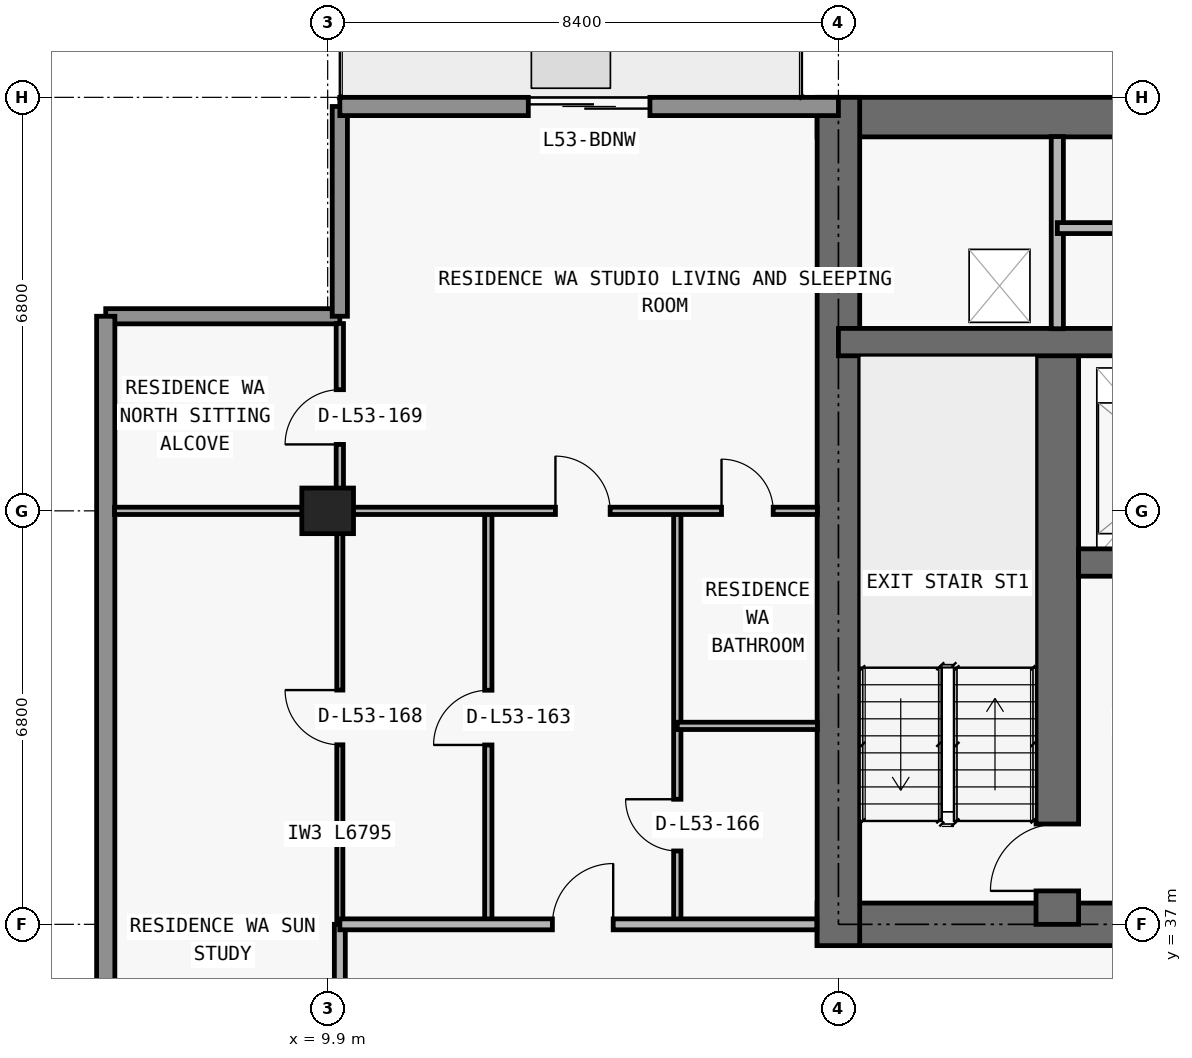
"""IFC4 building model, lengths in metres.
Left out: names, types, materials, properties, quantities, classifications, styles, units other than length and angle.
Written with IfcOpenShell. Run it as: python <this file> out.ifc"""

import sys

from ifc_helpers import new_model, si_unit, direction, frame, frame_2d, origin, origin_2d, place, context, subcontext, project, spatial, rectangle, extrude, element, fill, save


model = new_model("IFC4")
c1 = context("Model", 3, precision=1e-05, world=origin(), true_north=direction((0.0, 1.0)))
c2 = subcontext(c1, "Body", "Model", "MODEL_VIEW")
j1 = project(units=[si_unit("LENGTHUNIT", "METRE"), si_unit("PLANEANGLEUNIT", "RADIAN")], contexts=[c1])
p1 = place(None, origin())
s1 = spatial("IfcSite", under=j1, at=p1, CompositionType="ELEMENT")
p2 = place(p1, origin())
s2 = spatial("IfcBuilding", under=s1, at=p2, CompositionType="ELEMENT")
p3 = place(p2, frame((0.0, 0.0, 191.7)))
s3 = spatial("IfcBuildingStorey", under=s2, at=p3, CompositionType="ELEMENT", Elevation=191.7)
p4 = place(p3, frame((9.9, 43.8, 0.0), z_axis=(0.0, 0.0, 1.0), x_axis=(1.0, 0.0, 0.0)))
e1 = element("IfcColumn", 1, at=p4, inside=s3, PredefinedType="COLUMN", context=c2, shape_type="SweptSolid", body=[
    extrude(rectangle(XDim=0.85, YDim=0.75, at=origin_2d()), origin(), (0.0, 0.0, 1.0), 3.05),
])
p5 = place(p3, frame((17.95, 37.0, 0.0), z_axis=(0.0, 0.0, 1.0), x_axis=(1.0, 0.0, 0.0)))
e2 = element("IfcWall", 2, at=p5, inside=s3, PredefinedType="SHEAR", context=c2, shape_type="SweptSolid", body=[
    extrude(rectangle(XDim=41.9, YDim=0.7, at=frame_2d((20.95, 0.0))), origin(), (0.0, 0.0, 1.0), 3.05),
])
p6 = place(p5, frame((14.35, 0.0, 0.0)))
e3 = element("IfcOpeningElement", 3, at=p6, cuts=e2, PredefinedType="OPENING", context=c2, shape_type="SweptSolid", body=[
    extrude(rectangle(XDim=1.1, YDim=2.15, at=frame_2d((0.55, 1.075))), frame((0.0, 0.36, 0.0), z_axis=(0.0, -1.0, 0.0), x_axis=(1.0, 0.0, 0.0)), (0.0, 0.0, 1.0), 0.72),
])
p7 = place(p5, frame((6.2, 0.0, 0.0)))
e4 = element("IfcOpeningElement", 4, at=p7, cuts=e2, PredefinedType="OPENING", context=c2, shape_type="SweptSolid", body=[
    extrude(rectangle(XDim=1.05, YDim=2.15, at=frame_2d((0.525, 1.075))), frame((0.0, 0.36, 0.0), z_axis=(0.0, -1.0, 0.0), x_axis=(1.0, 0.0, 0.0)), (0.0, 0.0, 1.0), 0.72),
])
p8 = place(p5, frame((34.7, 0.0, 0.0)))
e5 = element("IfcOpeningElement", 5, at=p8, cuts=e2, PredefinedType="OPENING", context=c2, shape_type="SweptSolid", body=[
    extrude(rectangle(XDim=1.05, YDim=2.15, at=frame_2d((0.525, 1.075))), frame((0.0, 0.36, 0.0), z_axis=(0.0, -1.0, 0.0), x_axis=(1.0, 0.0, 0.0)), (0.0, 0.0, 1.0), 0.72),
])
p9 = place(p5, frame((10.812, 0.0, 0.0)))
e6 = element("IfcOpeningElement", 6, at=p9, cuts=e2, PredefinedType="OPENING", context=c2, shape_type="SweptSolid", body=[
    extrude(rectangle(XDim=1.05, YDim=2.15, at=frame_2d((0.525, 1.075))), frame((0.0, 0.36, 0.0), z_axis=(0.0, -1.0, 0.0), x_axis=(1.0, 0.0, 0.0)), (0.0, 0.0, 1.0), 0.72),
])
p10 = place(p5, frame((24.05, 0.0, 0.0)))
e7 = element("IfcOpeningElement", 7, at=p10, cuts=e2, PredefinedType="OPENING", context=c2, shape_type="SweptSolid", body=[
    extrude(rectangle(XDim=1.05, YDim=2.15, at=frame_2d((0.525, 1.075))), frame((0.0, 0.36, 0.0), z_axis=(0.0, -1.0, 0.0), x_axis=(1.0, 0.0, 0.0)), (0.0, 0.0, 1.0), 0.72),
])
p11 = place(p3, frame((17.95, 50.275, 0.0), z_axis=(0.0, 0.0, 1.0), x_axis=(1.0, 0.0, 0.0)))
e8 = element("IfcWall", 8, at=p11, inside=s3, PredefinedType="SHEAR", context=c2, shape_type="SweptSolid", body=[
    extrude(rectangle(XDim=41.9, YDim=0.65, at=frame_2d((20.95, 0.0))), origin(), (0.0, 0.0, 1.0), 3.05),
])
p12 = place(p3, frame((18.3, 36.65, 0.0), z_axis=(0.0, 0.0, 1.0), x_axis=(0.0, 1.0, 0.0)))
e9 = element("IfcWall", 9, at=p12, inside=s3, PredefinedType="SHEAR", context=c2, shape_type="SweptSolid", body=[
    extrude(rectangle(XDim=13.95, YDim=0.7, at=frame_2d((6.975, 0.0))), origin(), (0.0, 0.0, 1.0), 3.05),
])
p13 = place(p3, frame((21.9, 37.0, 0.0), z_axis=(0.0, 0.0, 1.0), x_axis=(0.0, 1.0, 0.0)))
e10 = element("IfcWall", 10, at=p13, inside=s3, PredefinedType="SHEAR", context=c2, shape_type="SweptSolid", body=[
    extrude(rectangle(XDim=9.575, YDim=0.7, at=frame_2d((4.788, 0.0))), origin(), (0.0, 0.0, 1.0), 3.05),
])
p14 = place(p13, frame((0.55, 0.0, 0.0)))
e11 = element("IfcOpeningElement", 11, at=p14, cuts=e10, PredefinedType="OPENING", context=c2, shape_type="SweptSolid", body=[
    extrude(rectangle(XDim=1.1, YDim=2.15, at=frame_2d((0.55, 1.075))), frame((0.0, 0.36, 0.0), z_axis=(0.0, -1.0, 0.0), x_axis=(1.0, 0.0, 0.0)), (0.0, 0.0, 1.0), 0.72),
])
p15 = place(p3, frame((22.25, 42.95, 0.0), z_axis=(0.0, 0.0, 1.0), x_axis=(1.0, 0.0, 0.0)))
e12 = element("IfcWall", 12, at=p15, inside=s3, PredefinedType="SHEAR", context=c2, shape_type="SweptSolid", body=[
    extrude(rectangle(XDim=33.3, YDim=0.45, at=frame_2d((16.65, 0.0))), origin(), (0.0, 0.0, 1.0), 3.05),
])
p16 = place(p15, frame((1.05, 0.0, 0.0)))
e13 = element("IfcOpeningElement", 13, at=p16, cuts=e12, PredefinedType="OPENING", context=c2, shape_type="SweptSolid", body=[
    extrude(rectangle(XDim=1.2, YDim=2.2, at=frame_2d((0.6, 1.1))), frame((0.0, 0.235, 0.0), z_axis=(0.0, -1.0, 0.0), x_axis=(1.0, 0.0, 0.0)), (0.0, 0.0, 1.0), 0.47),
])
p17 = place(p15, frame((31.05, 0.0, 0.0)))
e14 = element("IfcOpeningElement", 14, at=p17, cuts=e12, PredefinedType="OPENING", context=c2, shape_type="SweptSolid", body=[
    extrude(rectangle(XDim=1.2, YDim=2.2, at=frame_2d((0.6, 1.1))), frame((0.0, 0.235, 0.0), z_axis=(0.0, -1.0, 0.0), x_axis=(1.0, 0.0, 0.0)), (0.0, 0.0, 1.0), 0.47),
])
p18 = place(p15, frame((26.45, 0.0, 0.0)))
e15 = element("IfcOpeningElement", 15, at=p18, cuts=e12, PredefinedType="OPENING", context=c2, shape_type="SweptSolid", body=[
    extrude(rectangle(XDim=1.1, YDim=2.2, at=frame_2d((0.55, 1.1))), frame((0.0, 0.235, 0.0), z_axis=(0.0, -1.0, 0.0), x_axis=(1.0, 0.0, 0.0)), (0.0, 0.0, 1.0), 0.47),
])
p19 = place(p15, frame((5.95, 0.0, 0.0)))
e16 = element("IfcOpeningElement", 16, at=p19, cuts=e12, PredefinedType="OPENING", context=c2, shape_type="SweptSolid", body=[
    extrude(rectangle(XDim=1.1, YDim=2.2, at=frame_2d((0.55, 1.1))), frame((0.0, 0.235, 0.0), z_axis=(0.0, -1.0, 0.0), x_axis=(1.0, 0.0, 0.0)), (0.0, 0.0, 1.0), 0.47),
])
p20 = place(p15, frame((3.625, 0.0, 0.0)))
e17 = element("IfcOpeningElement", 17, at=p20, cuts=e12, PredefinedType="OPENING", context=c2, shape_type="SweptSolid", body=[
    extrude(rectangle(XDim=1.05, YDim=2.15, at=frame_2d((0.525, 1.075))), frame((0.0, 0.235, 0.0), z_axis=(0.0, -1.0, 0.0), x_axis=(1.0, 0.0, 0.0)), (0.0, 0.0, 1.0), 0.47),
])
p21 = place(p15, frame((28.675, 0.0, 0.0)))
e18 = element("IfcOpeningElement", 18, at=p21, cuts=e12, PredefinedType="OPENING", context=c2, shape_type="SweptSolid", body=[
    extrude(rectangle(XDim=1.05, YDim=2.15, at=frame_2d((0.525, 1.075))), frame((0.0, 0.235, 0.0), z_axis=(0.0, -1.0, 0.0), x_axis=(1.0, 0.0, 0.0)), (0.0, 0.0, 1.0), 0.47),
])
p22 = place(p15, frame((15.225, 0.0, 0.0)))
e19 = element("IfcOpeningElement", 19, at=p22, cuts=e12, PredefinedType="OPENING", context=c2, shape_type="SweptSolid", body=[
    extrude(rectangle(XDim=1.0, YDim=2.2, at=frame_2d((0.5, 1.1))), frame((0.0, 0.235, 0.0), z_axis=(0.0, -1.0, 0.0), x_axis=(1.0, 0.0, 0.0)), (0.0, 0.0, 1.0), 0.47),
])
p23 = place(p15, frame((21.975, 0.0, 0.0)))
e20 = element("IfcOpeningElement", 20, at=p23, cuts=e12, PredefinedType="OPENING", context=c2, shape_type="SweptSolid", body=[
    extrude(rectangle(XDim=1.0, YDim=2.2, at=frame_2d((0.5, 1.1))), frame((0.0, 0.235, 0.0), z_axis=(0.0, -1.0, 0.0), x_axis=(1.0, 0.0, 0.0)), (0.0, 0.0, 1.0), 0.47),
])
p24 = place(p3, frame((18.3, 46.575, 0.0), z_axis=(0.0, 0.0, 1.0), x_axis=(1.0, 0.0, 0.0)))
e21 = element("IfcWall", 21, at=p24, inside=s3, PredefinedType="SHEAR", context=c2, shape_type="SweptSolid", body=[
    extrude(rectangle(XDim=41.2, YDim=0.45, at=frame_2d((20.6, 0.0))), origin(), (0.0, 0.0, 1.0), 3.05),
])
p25 = place(p24, frame((7.575, 0.0, 0.0)))
e22 = element("IfcOpeningElement", 22, at=p25, cuts=e21, PredefinedType="OPENING", context=c2, shape_type="SweptSolid", body=[
    extrude(rectangle(XDim=1.05, YDim=2.15, at=frame_2d((0.525, 1.075))), frame((0.0, 0.235, 0.0), z_axis=(0.0, -1.0, 0.0), x_axis=(1.0, 0.0, 0.0)), (0.0, 0.0, 1.0), 0.47),
])
p26 = place(p24, frame((32.625, 0.0, 0.0)))
e23 = element("IfcOpeningElement", 23, at=p26, cuts=e21, PredefinedType="OPENING", context=c2, shape_type="SweptSolid", body=[
    extrude(rectangle(XDim=1.05, YDim=2.15, at=frame_2d((0.525, 1.075))), frame((0.0, 0.235, 0.0), z_axis=(0.0, -1.0, 0.0), x_axis=(1.0, 0.0, 0.0)), (0.0, 0.0, 1.0), 0.47),
])
p27 = place(p3, frame((6.25, 47.0, 0.0), z_axis=(0.0, 0.0, 1.0), x_axis=(1.0, 0.0, 0.0)))
e24 = element("IfcWall", 24, at=p27, inside=s3, PredefinedType="ELEMENTEDWALL", context=c2, shape_type="SweptSolid", body=[
    extrude(rectangle(XDim=3.85, YDim=0.25, at=frame_2d((1.925, 0.0))), origin(), (0.0, 0.0, 1.0), 3.05),
])
p28 = place(p3, frame((10.1, 47.0, 0.0), z_axis=(0.0, 0.0, 1.0), x_axis=(0.0, 1.0, 0.0)))
e25 = element("IfcWall", 25, at=p28, inside=s3, PredefinedType="ELEMENTEDWALL", context=c2, shape_type="SweptSolid", body=[
    extrude(rectangle(XDim=3.45, YDim=0.25, at=frame_2d((1.725, 0.0))), origin(), (0.0, 0.0, 1.0), 3.05),
])
p29 = place(p3, frame((6.25, 29.1, 0.0), z_axis=(0.0, 0.0, 1.0), x_axis=(0.0, 1.0, 0.0)))
e26 = element("IfcWall", 26, at=p29, inside=s3, PredefinedType="STANDARD", context=c2, shape_type="SweptSolid", body=[
    extrude(rectangle(XDim=17.9, YDim=0.3, at=frame_2d((8.95, 0.0))), origin(), (0.0, 0.0, 1.0), 3.05),
])
p30 = place(p3, frame((10.1, 50.45, 0.0), z_axis=(0.0, 0.0, 1.0), x_axis=(1.0, 0.0, 0.0)))
e27 = element("IfcWall", 27, at=p30, inside=s3, PredefinedType="STANDARD", context=c2, shape_type="SweptSolid", body=[
    extrude(rectangle(XDim=8.2, YDim=0.3, at=frame_2d((4.1, 0.0))), origin(), (0.0, 0.0, 1.0), 3.05),
])
p31 = place(p30, frame((3.1, 0.0, 0.0)))
e28 = element("IfcOpeningElement", 28, at=p31, cuts=e27, PredefinedType="OPENING", context=c2, shape_type="SweptSolid", body=[
    extrude(rectangle(XDim=2.0, YDim=2.3, at=frame_2d((1.0, 1.15))), frame((0.0, 0.16, 0.0), z_axis=(0.0, -1.0, 0.0), x_axis=(1.0, 0.0, 0.0)), (0.0, 0.0, 1.0), 0.32),
])
p32 = place(p3, frame((10.1, 33.505, 0.0), z_axis=(0.0, 0.0, 1.0), x_axis=(0.0, 1.0, 0.0)))
e29 = element("IfcWall", 29, at=p32, inside=s3, PredefinedType="PARTITIONING", context=c2, shape_type="SweptSolid", body=[
    extrude(rectangle(XDim=3.495, YDim=0.18, at=frame_2d((1.748, 0.0))), origin(), (0.0, 0.0, 1.0), 2.263),
])
p33 = place(p3, frame((10.1, 37.005, 0.0), z_axis=(0.0, 0.0, 1.0), x_axis=(0.0, 1.0, 0.0)))
e30 = element("IfcWall", 30, at=p33, inside=s3, PredefinedType="MOVABLE", context=c2, shape_type="SweptSolid", body=[
    extrude(rectangle(XDim=6.795, YDim=0.1, at=frame_2d((3.397, 0.0))), origin(), (0.0, 0.0, 1.0), 2.263),
])
p34 = place(p33, frame((2.948, 0.0, 0.0)))
e31 = element("IfcOpeningElement", 31, at=p34, cuts=e30, PredefinedType="OPENING", context=c2, shape_type="SweptSolid", body=[
    extrude(rectangle(XDim=0.9, YDim=2.15, at=frame_2d((0.45, 1.075))), frame((0.0, 0.06, 0.0), z_axis=(0.0, -1.0, 0.0), x_axis=(1.0, 0.0, 0.0)), (0.0, 0.0, 1.0), 0.12),
])
p35 = place(p3, frame((10.1, 43.805, 0.0), z_axis=(0.0, 0.0, 1.0), x_axis=(0.0, 1.0, 0.0)))
e32 = element("IfcWall", 32, at=p35, inside=s3, PredefinedType="PARTITIONING", context=c2, shape_type="SweptSolid", body=[
    extrude(rectangle(XDim=3.075, YDim=0.12, at=frame_2d((1.538, 0.0))), origin(), (0.0, 0.0, 1.0), 3.05),
])
p36 = place(p35, frame((1.087, 0.0, 0.0)))
e33 = element("IfcOpeningElement", 33, at=p36, cuts=e32, PredefinedType="OPENING", context=c2, shape_type="SweptSolid", body=[
    extrude(rectangle(XDim=0.9, YDim=2.15, at=frame_2d((0.45, 1.075))), frame((0.0, 0.07, 0.0), z_axis=(0.0, -1.0, 0.0), x_axis=(1.0, 0.0, 0.0)), (0.0, 0.0, 1.0), 0.14),
])
p37 = place(p3, frame((12.542, 37.0, 0.0), z_axis=(0.0, 0.0, 1.0), x_axis=(0.0, 1.0, 0.0)))
e34 = element("IfcWall", 34, at=p37, inside=s3, PredefinedType="PARTITIONING", context=c2, shape_type="SweptSolid", body=[
    extrude(rectangle(XDim=6.8, YDim=0.12, at=frame_2d((3.4, 0.0))), origin(), (0.0, 0.0, 1.0), 3.05),
])
p38 = place(p37, frame((2.95, 0.0, 0.0)))
e35 = element("IfcOpeningElement", 35, at=p38, cuts=e34, PredefinedType="OPENING", context=c2, shape_type="SweptSolid", body=[
    extrude(rectangle(XDim=0.9, YDim=2.15, at=frame_2d((0.45, 1.075))), frame((0.0, 0.07, 0.0), z_axis=(0.0, -1.0, 0.0), x_axis=(1.0, 0.0, 0.0)), (0.0, 0.0, 1.0), 0.14),
])
p39 = place(p3, frame((15.65, 37.0, 0.0), z_axis=(0.0, 0.0, 1.0), x_axis=(0.0, 1.0, 0.0)))
e36 = element("IfcWall", 36, at=p39, inside=s3, PredefinedType="PARTITIONING", context=c2, shape_type="SweptSolid", body=[
    extrude(rectangle(XDim=6.8, YDim=0.12, at=frame_2d((3.4, 0.0))), origin(), (0.0, 0.0, 1.0), 3.05),
])
p40 = place(p39, frame((1.207, 0.0, 0.0)))
e37 = element("IfcOpeningElement", 37, at=p40, cuts=e36, PredefinedType="OPENING", context=c2, shape_type="SweptSolid", body=[
    extrude(rectangle(XDim=0.85, YDim=2.1, at=frame_2d((0.425, 1.05))), frame((0.0, 0.07, 0.0), z_axis=(0.0, -1.0, 0.0), x_axis=(1.0, 0.0, 0.0)), (0.0, 0.0, 1.0), 0.14),
])
p41 = place(p3, frame((21.9, 46.795, 0.0), z_axis=(0.0, 0.0, 1.0), x_axis=(0.0, 1.0, 0.0)))
e38 = element("IfcWall", 38, at=p41, inside=s3, PredefinedType="PARTITIONING", context=c2, shape_type="SweptSolid", body=[
    extrude(rectangle(XDim=3.16, YDim=0.2, at=frame_2d((1.58, 0.0))), origin(), (0.0, 0.0, 1.0), 3.05),
])
p42 = place(p3, frame((10.1, 37.0, 0.0), z_axis=(0.0, 0.0, 1.0), x_axis=(1.0, 0.0, 0.0)))
e39 = element("IfcWall", 39, at=p42, inside=s3, PredefinedType="PARTITIONING", context=c2, shape_type="SweptSolid", body=[
    extrude(rectangle(XDim=7.845, YDim=0.18, at=frame_2d((3.922, 0.0))), origin(), (0.0, 0.0, 1.0), 3.05),
])
p43 = place(p42, frame((3.496, 0.0, 0.0)))
e40 = element("IfcOpeningElement", 40, at=p43, cuts=e39, PredefinedType="OPENING", context=c2, shape_type="SweptSolid", body=[
    extrude(rectangle(XDim=1.0, YDim=2.2, at=frame_2d((0.5, 1.1))), frame((0.0, 0.1, 0.0), z_axis=(0.0, -1.0, 0.0), x_axis=(1.0, 0.0, 0.0)), (0.0, 0.0, 1.0), 0.2),
])
p44 = place(p3, frame((15.65, 40.264, 0.0), z_axis=(0.0, 0.0, 1.0), x_axis=(1.0, 0.0, 0.0)))
e41 = element("IfcWall", 41, at=p44, inside=s3, PredefinedType="PARTITIONING", context=c2, shape_type="SweptSolid", body=[
    extrude(rectangle(XDim=2.305, YDim=0.12, at=frame_2d((1.153, 0.0))), origin(), (0.0, 0.0, 1.0), 3.05),
])
p45 = place(p3, frame((6.395, 43.8, 0.0), z_axis=(0.0, 0.0, 1.0), x_axis=(1.0, 0.0, 0.0)))
e42 = element("IfcWall", 42, at=p45, inside=s3, PredefinedType="PARTITIONING", context=c2, shape_type="SweptSolid", body=[
    extrude(rectangle(XDim=11.56, YDim=0.12, at=frame_2d((5.78, 0.0))), origin(), (0.0, 0.0, 1.0), 2.418),
])
p46 = place(p45, frame((7.251, 0.0, 0.0)))
e43 = element("IfcOpeningElement", 43, at=p46, cuts=e42, PredefinedType="OPENING", context=c2, shape_type="SweptSolid", body=[
    extrude(rectangle(XDim=0.9, YDim=2.15, at=frame_2d((0.45, 1.075))), frame((0.0, 0.07, 0.0), z_axis=(0.0, -1.0, 0.0), x_axis=(1.0, 0.0, 0.0)), (0.0, 0.0, 1.0), 0.14),
])
p47 = place(p45, frame((9.982, 0.0, 0.0)))
e44 = element("IfcOpeningElement", 44, at=p47, cuts=e42, PredefinedType="OPENING", context=c2, shape_type="SweptSolid", body=[
    extrude(rectangle(XDim=0.85, YDim=2.1, at=frame_2d((0.425, 1.05))), frame((0.0, 0.07, 0.0), z_axis=(0.0, -1.0, 0.0), x_axis=(1.0, 0.0, 0.0)), (0.0, 0.0, 1.0), 0.14),
])
p48 = place(p3, frame((21.9, 48.45, 0.0), z_axis=(0.0, 0.0, 1.0), x_axis=(1.0, 0.0, 0.0)))
e45 = element("IfcWall", 45, at=p48, inside=s3, PredefinedType="PARTITIONING", context=c2, shape_type="SweptSolid", body=[
    extrude(rectangle(XDim=4.75, YDim=0.18, at=frame_2d((2.375, 0.0))), origin(), (0.0, 0.0, 1.0), 3.05),
])
p49 = place(p48, frame((1.775, 0.0, 0.0)))
e46 = element("IfcOpeningElement", 46, at=p49, cuts=e45, PredefinedType="OPENING", context=c2, shape_type="SweptSolid", body=[
    extrude(rectangle(XDim=1.2, YDim=2.2, at=frame_2d((0.6, 1.1))), frame((0.0, 0.1, 0.0), z_axis=(0.0, -1.0, 0.0), x_axis=(1.0, 0.0, 0.0)), (0.0, 0.0, 1.0), 0.2),
])
p50 = place(p31, origin())
e47 = element("IfcDoor", 47, at=p50, inside=s3, OperationType="DOUBLE_DOOR_SLIDING", PredefinedType="DOOR", context=c2, shape_type="SweptSolid", body=[
    extrude(rectangle(XDim=2.0, YDim=2.3, at=frame_2d((1.0, 1.15))), frame((0.0, 0.025, 0.0), z_axis=(0.0, -1.0, 0.0), x_axis=(1.0, 0.0, 0.0)), (0.0, 0.0, 1.0), 0.05),
])
fill(e28, e47)
p51 = place(p14, origin())
e48 = element("IfcDoor", 48, at=p51, inside=s3, OperationType="SINGLE_SWING_LEFT", PredefinedType="DOOR", context=c2, shape_type="SweptSolid", body=[
    extrude(rectangle(XDim=1.1, YDim=2.15, at=frame_2d((0.55, 1.075))), frame((0.0, 0.025, 0.0), z_axis=(0.0, -1.0, 0.0), x_axis=(1.0, 0.0, 0.0)), (0.0, 0.0, 1.0), 0.05),
])
fill(e11, e48)
p52 = place(p38, origin())
e49 = element("IfcDoor", 49, at=p52, inside=s3, OperationType="SINGLE_SWING_LEFT", PredefinedType="DOOR", context=c2, shape_type="SweptSolid", body=[
    extrude(rectangle(XDim=0.9, YDim=2.15, at=frame_2d((0.45, 1.075))), frame((0.0, 0.025, 0.0), z_axis=(0.0, -1.0, 0.0), x_axis=(1.0, 0.0, 0.0)), (0.0, 0.0, 1.0), 0.05),
])
fill(e35, e49)
p53 = place(p43, origin())
e50 = element("IfcDoor", 50, at=p53, inside=s3, OperationType="SINGLE_SWING_RIGHT", PredefinedType="DOOR", context=c2, shape_type="SweptSolid", body=[
    extrude(rectangle(XDim=1.0, YDim=2.2, at=frame_2d((0.5, 1.1))), frame((0.0, 0.025, 0.0), z_axis=(0.0, -1.0, 0.0), x_axis=(1.0, 0.0, 0.0)), (0.0, 0.0, 1.0), 0.05),
])
fill(e40, e50)
p54 = place(p46, origin())
e51 = element("IfcDoor", 51, at=p54, inside=s3, OperationType="SINGLE_SWING_LEFT", PredefinedType="DOOR", context=c2, shape_type="SweptSolid", body=[
    extrude(rectangle(XDim=0.9, YDim=2.15, at=frame_2d((0.45, 1.075))), frame((0.0, 0.025, 0.0), z_axis=(0.0, -1.0, 0.0), x_axis=(1.0, 0.0, 0.0)), (0.0, 0.0, 1.0), 0.05),
])
fill(e43, e51)
p55 = place(p40, origin())
e52 = element("IfcDoor", 52, at=p55, inside=s3, OperationType="SINGLE_SWING_RIGHT", PredefinedType="DOOR", context=c2, shape_type="SweptSolid", body=[
    extrude(rectangle(XDim=0.85, YDim=2.1, at=frame_2d((0.425, 1.05))), frame((0.0, 0.025, 0.0), z_axis=(0.0, -1.0, 0.0), x_axis=(1.0, 0.0, 0.0)), (0.0, 0.0, 1.0), 0.05),
])
fill(e37, e52)
p56 = place(p47, origin())
e53 = element("IfcDoor", 53, at=p56, inside=s3, OperationType="SINGLE_SWING_LEFT", PredefinedType="DOOR", context=c2, shape_type="SweptSolid", body=[
    extrude(rectangle(XDim=0.85, YDim=2.1, at=frame_2d((0.425, 1.05))), frame((0.0, 0.025, 0.0), z_axis=(0.0, -1.0, 0.0), x_axis=(1.0, 0.0, 0.0)), (0.0, 0.0, 1.0), 0.05),
])
fill(e44, e53)
p57 = place(p34, origin())
e54 = element("IfcDoor", 54, at=p57, inside=s3, OperationType="SINGLE_SWING_RIGHT", PredefinedType="DOOR", context=c2, shape_type="SweptSolid", body=[
    extrude(rectangle(XDim=0.9, YDim=2.15, at=frame_2d((0.45, 1.075))), frame((0.0, 0.025, 0.0), z_axis=(0.0, -1.0, 0.0), x_axis=(1.0, 0.0, 0.0)), (0.0, 0.0, 1.0), 0.05),
])
fill(e31, e54)
p58 = place(p36, origin())
e55 = element("IfcDoor", 55, at=p58, inside=s3, OperationType="SINGLE_SWING_LEFT", PredefinedType="DOOR", context=c2, shape_type="SweptSolid", body=[
    extrude(rectangle(XDim=0.9, YDim=2.15, at=frame_2d((0.45, 1.075))), frame((0.0, 0.025, 0.0), z_axis=(0.0, -1.0, 0.0), x_axis=(1.0, 0.0, 0.0)), (0.0, 0.0, 1.0), 0.05),
])
fill(e33, e55)
save(model, sys.argv[1])
